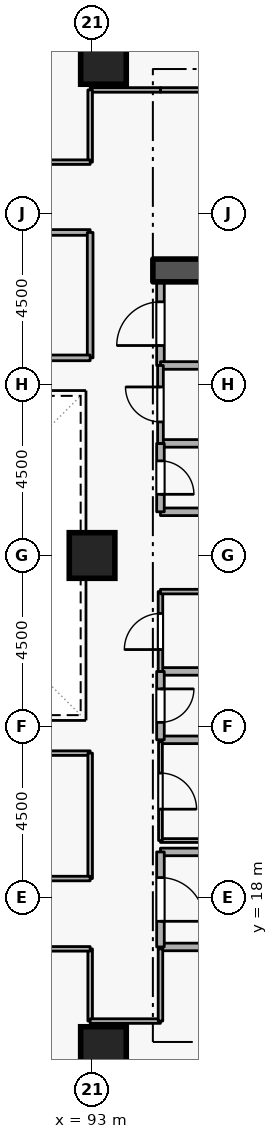
"""IFC4 building model, lengths in metres.
Left out: names, types, materials, properties, quantities, classifications, styles, units other than length and angle.
Written with IfcOpenShell. Run it as: python <this file> out.ifc"""

import sys

from ifc_helpers import new_model, si_unit, direction, frame, frame_2d, origin, origin_2d, place, context, subcontext, project, spatial, rectangle, extrude, element, fill, save


model = new_model("IFC4")
c1 = context("Model", 3, precision=1e-05, world=origin(), true_north=direction((0.0, 1.0)))
c2 = subcontext(c1, "Body", "Model", "MODEL_VIEW")
j1 = project(units=[si_unit("LENGTHUNIT", "METRE"), si_unit("PLANEANGLEUNIT", "RADIAN")], contexts=[c1])
p1 = place(None, origin())
s1 = spatial("IfcSite", under=j1, at=p1, CompositionType="ELEMENT")
p2 = place(p1, origin())
s2 = spatial("IfcBuilding", under=s1, at=p2, CompositionType="ELEMENT")
p3 = place(p2, frame((0.0, 0.0, 87.3)))
s3 = spatial("IfcBuildingStorey", under=s2, at=p3, CompositionType="ELEMENT", Elevation=87.3)
p4 = place(p3, frame((94.6, 34.5, 0.0), z_axis=(0.0, 0.0, 1.0), x_axis=(1.0, 0.0, 0.0)))
e1 = element("IfcWall", 1, at=p4, inside=s3, PredefinedType="SHEAR", context=c2, shape_type="SweptSolid", body=[
    extrude(rectangle(XDim=5.7, YDim=0.6, at=frame_2d((2.85, 0.0))), origin(), (0.0, 0.0, 1.0), 3.6),
])
for number, where, z_axis, x_axis in (
    (2, (93.3, 14.0, 0.0), (0.0, 0.0, 1.0), (1.0, 0.0, 0.0)),
    (3, (93.3, 40.0, 0.0), (0.0, 0.0, 1.0), (1.0, 0.0, 0.0)),
    (4, (93.0, 27.0, 0.0), (0.0, 0.0, 1.0), (1.0, 0.0, 0.0)),
):
    element("IfcColumn", number, at=place(p3, frame(where, z_axis=z_axis, x_axis=x_axis)), inside=s3, PredefinedType="COLUMN", context=c2, shape_type="SweptSolid", body=[
        extrude(rectangle(XDim=1.2, YDim=1.2, at=origin_2d()), origin(), (0.0, 0.0, 1.0), 3.6),
    ])
p5 = place(p3, frame((94.8, 16.7, 0.0), z_axis=(0.0, 0.0, 1.0), x_axis=(1.0, 0.0, 0.0)))
e5 = element("IfcWall", 5, at=p5, inside=s3, PredefinedType="STANDARD", context=c2, shape_type="SweptSolid", body=[
    extrude(rectangle(XDim=5.7, YDim=0.2, at=frame_2d((2.85, 0.0))), origin(), (0.0, 0.0, 1.0), 3.34),
])
p6 = place(p3, frame((97.1, 19.2, 0.0), z_axis=(0.0, 0.0, 1.0), x_axis=(-1.0, 0.0, 0.0)))
e6 = element("IfcWall", 6, at=p6, inside=s3, PredefinedType="STANDARD", context=c2, shape_type="SweptSolid", body=[
    extrude(rectangle(XDim=2.3, YDim=0.2, at=frame_2d((1.15, 0.0))), origin(), (0.0, 0.0, 1.0), 2.545),
])
p7 = place(p3, frame((94.8, 19.2, 0.0), z_axis=(0.0, 0.0, 1.0), x_axis=(0.0, -1.0, 0.0)))
e7 = element("IfcWall", 7, at=p7, inside=s3, PredefinedType="STANDARD", context=c2, shape_type="SweptSolid", body=[
    extrude(rectangle(XDim=2.5, YDim=0.2, at=frame_2d((1.25, 0.0))), origin(), (0.0, 0.0, 1.0), 3.34),
])
p8 = place(p7, frame((0.675, 0.0, 0.0)))
e8 = element("IfcOpeningElement", 8, at=p8, cuts=e7, PredefinedType="OPENING", context=c2, shape_type="SweptSolid", body=[
    extrude(rectangle(XDim=1.15, YDim=2.1, at=frame_2d((0.575, 1.05))), frame((0.0, 0.11, 0.0), z_axis=(0.0, -1.0, 0.0), x_axis=(1.0, 0.0, 0.0)), (0.0, 0.0, 1.0), 0.22),
])
for number, where, z_axis, x_axis in (
    (9, (94.8, 28.15, 0.0), (0.0, 0.0, 1.0), (1.0, 0.0, 0.0)),
    (10, (96.85, 29.95, 0.0), (0.0, 0.0, 1.0), (-1.0, 0.0, 0.0)),
):
    element("IfcWall", number, at=place(p3, frame(where, z_axis=z_axis, x_axis=x_axis)), inside=s3, PredefinedType="STANDARD", context=c2, shape_type="SweptSolid", body=[
        extrude(rectangle(XDim=2.05, YDim=0.2, at=frame_2d((1.025, 0.0))), origin(), (0.0, 0.0, 1.0), 3.34),
    ])
p9 = place(p3, frame((94.8, 29.95, 0.0), z_axis=(0.0, 0.0, 1.0), x_axis=(0.0, -1.0, 0.0)))
e11 = element("IfcWall", 11, at=p9, inside=s3, PredefinedType="STANDARD", context=c2, shape_type="SweptSolid", body=[
    extrude(rectangle(XDim=1.8, YDim=0.2, at=frame_2d((0.9, 0.0))), origin(), (0.0, 0.0, 1.0), 3.34),
])
p10 = place(p9, frame((0.46, 0.0, 0.0)))
e12 = element("IfcOpeningElement", 12, at=p10, cuts=e11, PredefinedType="OPENING", context=c2, shape_type="SweptSolid", body=[
    extrude(rectangle(XDim=0.88, YDim=2.04, at=frame_2d((0.44, 1.02))), frame((0.0, 0.11, 0.0), z_axis=(0.0, -1.0, 0.0), x_axis=(1.0, 0.0, 0.0)), (0.0, 0.0, 1.0), 0.22),
])
for number, where, z_axis, x_axis in (
    (13, (94.8, 22.15, 0.0), (0.0, 0.0, 1.0), (1.0, 0.0, 0.0)),
    (14, (96.85, 23.95, 0.0), (0.0, 0.0, 1.0), (-1.0, 0.0, 0.0)),
):
    element("IfcWall", number, at=place(p3, frame(where, z_axis=z_axis, x_axis=x_axis)), inside=s3, PredefinedType="STANDARD", context=c2, shape_type="SweptSolid", body=[
        extrude(rectangle(XDim=2.05, YDim=0.2, at=frame_2d((1.025, 0.0))), origin(), (0.0, 0.0, 1.0), 3.34),
    ])
p11 = place(p3, frame((94.8, 23.95, 0.0), z_axis=(0.0, 0.0, 1.0), x_axis=(0.0, -1.0, 0.0)))
e15 = element("IfcWall", 15, at=p11, inside=s3, PredefinedType="STANDARD", context=c2, shape_type="SweptSolid", body=[
    extrude(rectangle(XDim=1.8, YDim=0.2, at=frame_2d((0.9, 0.0))), origin(), (0.0, 0.0, 1.0), 3.34),
])
p12 = place(p11, frame((0.46, 0.0, 0.0)))
e16 = element("IfcOpeningElement", 16, at=p12, cuts=e15, PredefinedType="OPENING", context=c2, shape_type="SweptSolid", body=[
    extrude(rectangle(XDim=0.88, YDim=2.04, at=frame_2d((0.44, 1.02))), frame((0.0, 0.11, 0.0), z_axis=(0.0, -1.0, 0.0), x_axis=(1.0, 0.0, 0.0)), (0.0, 0.0, 1.0), 0.22),
])
p13 = place(p3, frame((94.8, 32.0, 0.0), z_axis=(0.0, 0.0, 1.0), x_axis=(0.0, 1.0, 0.0)))
e17 = element("IfcWall", 17, at=p13, inside=s3, PredefinedType="STANDARD", context=c2, shape_type="SweptSolid", body=[
    extrude(rectangle(XDim=2.2, YDim=0.2, at=frame_2d((1.1, 0.0))), origin(), (0.0, 0.0, 1.0), 3.34),
])
p14 = place(p13, frame((0.525, 0.0, 0.0)))
e18 = element("IfcOpeningElement", 18, at=p14, cuts=e17, PredefinedType="OPENING", context=c2, shape_type="SweptSolid", body=[
    extrude(rectangle(XDim=1.15, YDim=2.1, at=frame_2d((0.575, 1.05))), frame((0.0, 0.11, 0.0), z_axis=(0.0, -1.0, 0.0), x_axis=(1.0, 0.0, 0.0)), (0.0, 0.0, 1.0), 0.22),
])
p15 = place(p3, frame((96.85, 32.0, 0.0), z_axis=(0.0, 0.0, 1.0), x_axis=(-1.0, 0.0, 0.0)))
e19 = element("IfcWall", 19, at=p15, inside=s3, PredefinedType="STANDARD", context=c2, shape_type="SweptSolid", body=[
    extrude(rectangle(XDim=2.05, YDim=0.2, at=frame_2d((1.025, 0.0))), origin(), (0.0, 0.0, 1.0), 3.34),
])
p16 = place(p3, frame((94.8, 19.5, 0.0), z_axis=(0.0, 0.0, 1.0), x_axis=(1.0, 0.0, 0.0)))
e20 = element("IfcWall", 20, at=p16, inside=s3, PredefinedType="PARTITIONING", context=c2, shape_type="SweptSolid", body=[
    extrude(rectangle(XDim=2.05, YDim=0.1, at=frame_2d((1.025, 0.0))), origin(), (0.0, 0.0, 1.0), 2.545),
])
p17 = place(p3, frame((94.8, 22.1, 0.0), z_axis=(0.0, 0.0, 1.0), x_axis=(0.0, -1.0, 0.0)))
e21 = element("IfcWall", 21, at=p17, inside=s3, PredefinedType="PARTITIONING", context=c2, shape_type="SweptSolid", body=[
    extrude(rectangle(XDim=2.6, YDim=0.1, at=frame_2d((1.3, 0.0))), origin(), (0.0, 0.0, 1.0), 3.34),
])
p18 = place(p17, frame((0.825, 0.0, 0.0)))
e22 = element("IfcOpeningElement", 22, at=p18, cuts=e21, PredefinedType="OPENING", context=c2, shape_type="SweptSolid", body=[
    extrude(rectangle(XDim=0.95, YDim=2.1, at=frame_2d((0.475, 1.05))), frame((0.0, 0.06, 0.0), z_axis=(0.0, -1.0, 0.0), x_axis=(1.0, 0.0, 0.0)), (0.0, 0.0, 1.0), 0.12),
])
p19 = place(p3, frame((94.8, 23.95, 0.0), z_axis=(0.0, 0.0, 1.0), x_axis=(0.0, 1.0, 0.0)))
e23 = element("IfcWall", 23, at=p19, inside=s3, PredefinedType="PARTITIONING", context=c2, shape_type="SweptSolid", body=[
    extrude(rectangle(XDim=2.1, YDim=0.12, at=frame_2d((1.05, 0.0))), origin(), (0.0, 0.0, 1.0), 3.34),
])
p20 = place(p19, frame((0.575, 0.0, 0.0)))
e24 = element("IfcOpeningElement", 24, at=p20, cuts=e23, PredefinedType="OPENING", context=c2, shape_type="SweptSolid", body=[
    extrude(rectangle(XDim=0.95, YDim=2.1, at=frame_2d((0.475, 1.05))), frame((0.0, 0.07, 0.0), z_axis=(0.0, -1.0, 0.0), x_axis=(1.0, 0.0, 0.0)), (0.0, 0.0, 1.0), 0.14),
])
p21 = place(p3, frame((94.8, 26.05, 0.0), z_axis=(0.0, 0.0, 1.0), x_axis=(1.0, 0.0, 0.0)))
e25 = element("IfcWall", 25, at=p21, inside=s3, PredefinedType="PARTITIONING", context=c2, shape_type="SweptSolid", body=[
    extrude(rectangle(XDim=2.05, YDim=0.12, at=frame_2d((1.025, 0.0))), origin(), (0.0, 0.0, 1.0), 3.34),
])
p22 = place(p3, frame((94.8, 29.95, 0.0), z_axis=(0.0, 0.0, 1.0), x_axis=(0.0, 1.0, 0.0)))
e26 = element("IfcWall", 26, at=p22, inside=s3, PredefinedType="PARTITIONING", context=c2, shape_type="SweptSolid", body=[
    extrude(rectangle(XDim=2.05, YDim=0.15, at=frame_2d((1.025, 0.0))), origin(), (0.0, 0.0, 1.0), 3.34),
])
p23 = place(p22, frame((0.565, 0.0, 0.0)))
e27 = element("IfcOpeningElement", 27, at=p23, cuts=e26, PredefinedType="OPENING", context=c2, shape_type="SweptSolid", body=[
    extrude(rectangle(XDim=0.92, YDim=2.08, at=frame_2d((0.46, 1.04))), frame((0.0, 0.085, 0.0), z_axis=(0.0, -1.0, 0.0), x_axis=(1.0, 0.0, 0.0)), (0.0, 0.0, 1.0), 0.17),
])
p24 = place(p3, frame((92.95, 16.65, 0.0), z_axis=(0.0, 0.0, 1.0), x_axis=(0.0, -1.0, 0.0)))
e28 = element("IfcWall", 28, at=p24, inside=s3, PredefinedType="PARTITIONING", context=c2, shape_type="SweptSolid", body=[
    extrude(rectangle(XDim=1.9, YDim=0.12, at=frame_2d((0.95, 0.0))), origin(), (0.0, 0.0, 1.0), 3.34),
])
p25 = place(p3, frame((92.95, 14.75, 0.0), z_axis=(0.0, 0.0, 1.0), x_axis=(1.0, 0.0, 0.0)))
e29 = element("IfcWall", 29, at=p25, inside=s3, PredefinedType="PARTITIONING", context=c2, shape_type="SweptSolid", body=[
    extrude(rectangle(XDim=1.85, YDim=0.12, at=frame_2d((0.925, 0.0))), origin(), (0.0, 0.0, 1.0), 3.34),
])
p26 = place(p3, frame((94.8, 14.75, 0.0), z_axis=(0.0, 0.0, 1.0), x_axis=(0.0, 1.0, 0.0)))
e30 = element("IfcWall", 30, at=p26, inside=s3, PredefinedType="PARTITIONING", context=c2, shape_type="SweptSolid", body=[
    extrude(rectangle(XDim=1.9, YDim=0.12, at=frame_2d((0.95, 0.0))), origin(), (0.0, 0.0, 1.0), 3.34),
])
p27 = place(p3, frame((88.5, 16.65, 0.0), z_axis=(0.0, 0.0, 1.0), x_axis=(1.0, 0.0, 0.0)))
e31 = element("IfcWall", 31, at=p27, inside=s3, PredefinedType="PARTITIONING", context=c2, shape_type="SweptSolid", body=[
    extrude(rectangle(XDim=4.45, YDim=0.12, at=frame_2d((2.225, 0.0))), origin(), (0.0, 0.0, 1.0), 3.34),
])
p28 = place(p27, frame((1.7, 0.0, 0.0)))
e32 = element("IfcOpeningElement", 32, at=p28, cuts=e31, PredefinedType="OPENING", context=c2, shape_type="SweptSolid", body=[
    extrude(rectangle(XDim=1.05, YDim=2.1, at=frame_2d((0.525, 1.05))), frame((0.0, 0.07, 0.0), z_axis=(0.0, -1.0, 0.0), x_axis=(1.0, 0.0, 0.0)), (0.0, 0.0, 1.0), 0.14),
])
p29 = place(p3, frame((97.95, 39.25, 0.0), z_axis=(0.0, 0.0, 1.0), x_axis=(-1.0, 0.0, 0.0)))
e33 = element("IfcWall", 33, at=p29, inside=s3, PredefinedType="PARTITIONING", context=c2, shape_type="SweptSolid", body=[
    extrude(rectangle(XDim=3.15, YDim=0.12, at=frame_2d((1.575, 0.0))), origin(), (0.0, 0.0, 1.0), 3.34),
])
p30 = place(p3, frame((94.8, 39.25, 0.0), z_axis=(0.0, 0.0, 1.0), x_axis=(-1.0, 0.0, 0.0)))
e34 = element("IfcWall", 34, at=p30, inside=s3, PredefinedType="PARTITIONING", context=c2, shape_type="SweptSolid", body=[
    extrude(rectangle(XDim=1.85, YDim=0.12, at=frame_2d((0.925, 0.0))), origin(), (0.0, 0.0, 1.0), 3.34),
])
p31 = place(p3, frame((92.95, 39.25, 0.0), z_axis=(0.0, 0.0, 1.0), x_axis=(0.0, -1.0, 0.0)))
e35 = element("IfcWall", 35, at=p31, inside=s3, PredefinedType="PARTITIONING", context=c2, shape_type="SweptSolid", body=[
    extrude(rectangle(XDim=1.9, YDim=0.12, at=frame_2d((0.95, 0.0))), origin(), (0.0, 0.0, 1.0), 3.34),
])
p32 = place(p3, frame((92.95, 37.35, 0.0), z_axis=(0.0, 0.0, 1.0), x_axis=(-1.0, 0.0, 0.0)))
e36 = element("IfcWall", 36, at=p32, inside=s3, PredefinedType="PARTITIONING", context=c2, shape_type="SweptSolid", body=[
    extrude(rectangle(XDim=4.45, YDim=0.12, at=frame_2d((2.225, 0.0))), origin(), (0.0, 0.0, 1.0), 3.34),
])
p33 = place(p32, frame((1.7, 0.0, 0.0)))
e37 = element("IfcOpeningElement", 37, at=p33, cuts=e36, PredefinedType="OPENING", context=c2, shape_type="SweptSolid", body=[
    extrude(rectangle(XDim=1.05, YDim=2.1, at=frame_2d((0.525, 1.05))), frame((0.0, 0.07, 0.0), z_axis=(0.0, -1.0, 0.0), x_axis=(1.0, 0.0, 0.0)), (0.0, 0.0, 1.0), 0.14),
])
p34 = place(p3, frame((84.05, 35.5, 0.0), z_axis=(0.0, 0.0, 1.0), x_axis=(1.0, 0.0, 0.0)))
e38 = element("IfcWall", 38, at=p34, inside=s3, PredefinedType="PARTITIONING", context=c2, shape_type="SweptSolid", body=[
    extrude(rectangle(XDim=8.9, YDim=0.15, at=frame_2d((4.45, 0.0))), origin(), (0.0, 0.0, 1.0), 3.34),
])
p35 = place(p34, frame((3.8, 0.0, 0.0)))
e39 = element("IfcOpeningElement", 39, at=p35, cuts=e38, PredefinedType="OPENING", context=c2, shape_type="SweptSolid", body=[
    extrude(rectangle(XDim=1.3, YDim=2.12, at=frame_2d((0.65, 1.06))), frame((0.0, 0.085, 0.0), z_axis=(0.0, -1.0, 0.0), x_axis=(1.0, 0.0, 0.0)), (0.0, 0.0, 1.0), 0.17),
])
p36 = place(p3, frame((92.95, 35.5, 0.0), z_axis=(0.0, 0.0, 1.0), x_axis=(0.0, -1.0, 0.0)))
e40 = element("IfcWall", 40, at=p36, inside=s3, PredefinedType="PARTITIONING", context=c2, shape_type="SweptSolid", body=[
    extrude(rectangle(XDim=3.3, YDim=0.15, at=frame_2d((1.65, 0.0))), origin(), (0.0, 0.0, 1.0), 3.34),
])
p37 = place(p3, frame((92.95, 32.2, 0.0), z_axis=(0.0, 0.0, 1.0), x_axis=(-1.0, 0.0, 0.0)))
e41 = element("IfcWall", 41, at=p37, inside=s3, PredefinedType="PARTITIONING", context=c2, shape_type="SweptSolid", body=[
    extrude(rectangle(XDim=8.9, YDim=0.15, at=frame_2d((4.45, 0.0))), origin(), (0.0, 0.0, 1.0), 3.34),
])
p38 = place(p3, frame((84.05, 21.8, 0.0), z_axis=(0.0, 0.0, 1.0), x_axis=(1.0, 0.0, 0.0)))
e42 = element("IfcWall", 42, at=p38, inside=s3, PredefinedType="PARTITIONING", context=c2, shape_type="SweptSolid", body=[
    extrude(rectangle(XDim=8.9, YDim=0.12, at=frame_2d((4.45, 0.0))), origin(), (0.0, 0.0, 1.0), 3.34),
])
p39 = place(p3, frame((92.95, 21.8, 0.0), z_axis=(0.0, 0.0, 1.0), x_axis=(0.0, -1.0, 0.0)))
e43 = element("IfcWall", 43, at=p39, inside=s3, PredefinedType="PARTITIONING", context=c2, shape_type="SweptSolid", body=[
    extrude(rectangle(XDim=3.3, YDim=0.12, at=frame_2d((1.65, 0.0))), origin(), (0.0, 0.0, 1.0), 3.34),
])
p40 = place(p3, frame((92.95, 18.5, 0.0), z_axis=(0.0, 0.0, 1.0), x_axis=(-1.0, 0.0, 0.0)))
e44 = element("IfcWall", 44, at=p40, inside=s3, PredefinedType="PARTITIONING", context=c2, shape_type="SweptSolid", body=[
    extrude(rectangle(XDim=8.9, YDim=0.12, at=frame_2d((4.45, 0.0))), origin(), (0.0, 0.0, 1.0), 3.34),
])
p41 = place(p40, frame((3.975, 0.0, 0.0)))
e45 = element("IfcOpeningElement", 45, at=p41, cuts=e44, PredefinedType="OPENING", context=c2, shape_type="SweptSolid", body=[
    extrude(rectangle(XDim=0.95, YDim=2.1, at=frame_2d((0.475, 1.05))), frame((0.0, 0.07, 0.0), z_axis=(0.0, -1.0, 0.0), x_axis=(1.0, 0.0, 0.0)), (0.0, 0.0, 1.0), 0.14),
])
p42 = place(p8, origin())
e46 = element("IfcDoor", 46, at=p42, inside=s3, OperationType="SINGLE_SWING_RIGHT", PredefinedType="DOOR", context=c2, shape_type="SweptSolid", body=[
    extrude(rectangle(XDim=1.15, YDim=2.1, at=frame_2d((0.575, 1.05))), frame((0.0, 0.025, 0.0), z_axis=(0.0, -1.0, 0.0), x_axis=(1.0, 0.0, 0.0)), (0.0, 0.0, 1.0), 0.05),
])
fill(e8, e46)
p43 = place(p10, origin())
e47 = element("IfcDoor", 47, at=p43, inside=s3, OperationType="SINGLE_SWING_RIGHT", PredefinedType="DOOR", context=c2, shape_type="SweptSolid", body=[
    extrude(rectangle(XDim=0.88, YDim=2.04, at=frame_2d((0.44, 1.02))), frame((0.0, 0.025, 0.0), z_axis=(0.0, -1.0, 0.0), x_axis=(1.0, 0.0, 0.0)), (0.0, 0.0, 1.0), 0.05),
])
fill(e12, e47)
p44 = place(p12, origin())
e48 = element("IfcDoor", 48, at=p44, inside=s3, OperationType="SINGLE_SWING_LEFT", PredefinedType="DOOR", context=c2, shape_type="SweptSolid", body=[
    extrude(rectangle(XDim=0.88, YDim=2.04, at=frame_2d((0.44, 1.02))), frame((0.0, 0.025, 0.0), z_axis=(0.0, -1.0, 0.0), x_axis=(1.0, 0.0, 0.0)), (0.0, 0.0, 1.0), 0.05),
])
fill(e16, e48)
p45 = place(p18, origin())
e49 = element("IfcDoor", 49, at=p45, inside=s3, OperationType="SINGLE_SWING_RIGHT", PredefinedType="DOOR", context=c2, shape_type="SweptSolid", body=[
    extrude(rectangle(XDim=0.95, YDim=2.1, at=frame_2d((0.475, 1.05))), frame((0.0, 0.025, 0.0), z_axis=(0.0, -1.0, 0.0), x_axis=(1.0, 0.0, 0.0)), (0.0, 0.0, 1.0), 0.05),
])
fill(e22, e49)
p46 = place(p20, origin())
e50 = element("IfcDoor", 50, at=p46, inside=s3, OperationType="SINGLE_SWING_LEFT", PredefinedType="DOOR", context=c2, shape_type="SweptSolid", body=[
    extrude(rectangle(XDim=0.95, YDim=2.1, at=frame_2d((0.475, 1.05))), frame((0.0, 0.025, 0.0), z_axis=(0.0, -1.0, 0.0), x_axis=(1.0, 0.0, 0.0)), (0.0, 0.0, 1.0), 0.05),
])
fill(e24, e50)
p47 = place(p23, origin())
e51 = element("IfcDoor", 51, at=p47, inside=s3, OperationType="SINGLE_SWING_RIGHT", PredefinedType="DOOR", context=c2, shape_type="SweptSolid", body=[
    extrude(rectangle(XDim=0.92, YDim=2.08, at=frame_2d((0.46, 1.04))), frame((0.0, 0.025, 0.0), z_axis=(0.0, -1.0, 0.0), x_axis=(1.0, 0.0, 0.0)), (0.0, 0.0, 1.0), 0.05),
])
fill(e27, e51)
p48 = place(p14, origin())
e52 = element("IfcDoor", 52, at=p48, inside=s3, OperationType="SINGLE_SWING_LEFT", PredefinedType="DOOR", context=c2, shape_type="SweptSolid", body=[
    extrude(rectangle(XDim=1.15, YDim=2.1, at=frame_2d((0.575, 1.05))), frame((0.0, 0.025, 0.0), z_axis=(0.0, -1.0, 0.0), x_axis=(1.0, 0.0, 0.0)), (0.0, 0.0, 1.0), 0.05),
])
fill(e18, e52)
save(model, sys.argv[1])
